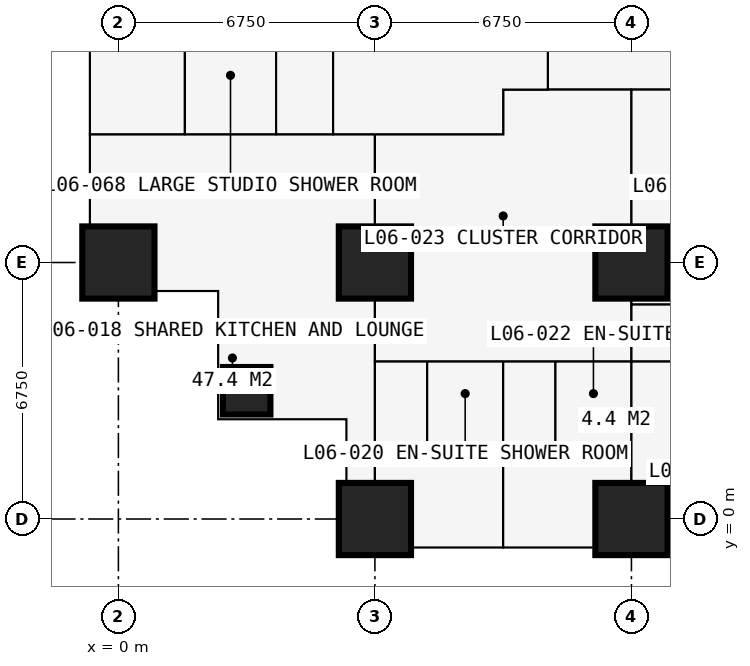
"""IFC4 building model, lengths in metres.
Left out: names, types, materials, properties, quantities, classifications, styles, units other than length and angle.
Written with IfcOpenShell. Run it as: python <this file> out.ifc"""

import sys

from ifc_helpers import new_model, si_unit, direction, frame, frame_2d, origin, origin_2d, place, context, subcontext, project, spatial, rectangle, extrude, element, fill, save


model = new_model("IFC4")
c1 = context("Model", 3, precision=1e-05, world=origin(), true_north=direction((0.0, 1.0)))
c2 = subcontext(c1, "Body", "Model", "MODEL_VIEW")
j1 = project(units=[si_unit("LENGTHUNIT", "METRE"), si_unit("PLANEANGLEUNIT", "RADIAN")], contexts=[c1])
p1 = place(None, origin())
s1 = spatial("IfcSite", under=j1, at=p1, CompositionType="ELEMENT")
p2 = place(p1, origin())
s2 = spatial("IfcBuilding", under=s1, at=p2, CompositionType="ELEMENT")
p3 = place(p2, frame((0.0, 0.0, 25.2)))
s3 = spatial("IfcBuildingStorey", under=s2, at=p3, CompositionType="ELEMENT", Elevation=25.2)
p4 = place(p3, frame((0.0, 6.75, 0.0), z_axis=(0.0, 0.0, 1.0), x_axis=(1.0, 0.0, 0.0)))
e1 = element("IfcColumn", 1, at=p4, inside=s3, PredefinedType="COLUMN", context=c2, shape_type="SweptSolid", body=[
    extrude(rectangle(XDim=1.9, YDim=1.9, at=origin_2d()), origin(), (0.0, 0.0, 1.0), 3.6),
])
p5 = place(p3, frame((3.375, 3.375, 0.0), z_axis=(0.0, 0.0, 1.0), x_axis=(1.0, 0.0, 0.0)))
e2 = element("IfcColumn", 2, at=p5, inside=s3, PredefinedType="COLUMN", context=c2, shape_type="SweptSolid", body=[
    extrude(rectangle(XDim=1.25, YDim=1.25, at=origin_2d()), origin(), (0.0, 0.0, 1.0), 3.6),
])
for number, where, z_axis, x_axis in (
    (3, (6.75, 0.0, 0.0), (0.0, 0.0, 1.0), (1.0, 0.0, 0.0)),
    (4, (6.75, 6.75, 0.0), (0.0, 0.0, 1.0), (1.0, 0.0, 0.0)),
    (5, (13.5, 0.0, 0.0), (0.0, 0.0, 1.0), (1.0, 0.0, 0.0)),
    (6, (13.5, 6.75, 0.0), (0.0, 0.0, 1.0), (1.0, 0.0, 0.0)),
):
    element("IfcColumn", number, at=place(p3, frame(where, z_axis=z_axis, x_axis=x_axis)), inside=s3, PredefinedType="COLUMN", context=c2, shape_type="SweptSolid", body=[
        extrude(rectangle(XDim=1.9, YDim=1.9, at=origin_2d()), origin(), (0.0, 0.0, 1.0), 3.6),
    ])
p6 = place(p3, frame((-0.75, 6.0, 0.0), z_axis=(0.0, 0.0, 1.0), x_axis=(1.0, 0.0, 0.0)))
e7 = element("IfcWall", 7, at=p6, inside=s3, PredefinedType="SOLIDWALL", context=c2, shape_type="SweptSolid", body=[
    extrude(rectangle(XDim=3.375, YDim=0.3, at=frame_2d((1.688, 0.0))), origin(), (0.0, 0.0, 1.0), 3.375),
])
p7 = place(p6, frame((1.857, 0.0, 0.9)))
e8 = element("IfcOpeningElement", 8, at=p7, cuts=e7, PredefinedType="OPENING", context=c2, shape_type="SweptSolid", body=[
    extrude(rectangle(XDim=1.2, YDim=1.8, at=frame_2d((0.6, 0.9))), frame((0.0, 0.16, 0.0), z_axis=(0.0, -1.0, 0.0), x_axis=(1.0, 0.0, 0.0)), (0.0, 0.0, 1.0), 0.32),
])
p8 = place(p3, frame((2.625, 6.0, 0.0), z_axis=(0.0, 0.0, 1.0), x_axis=(0.0, -1.0, 0.0)))
e9 = element("IfcWall", 9, at=p8, inside=s3, PredefinedType="SOLIDWALL", context=c2, shape_type="SweptSolid", body=[
    extrude(rectangle(XDim=3.375, YDim=0.3, at=frame_2d((1.688, 0.0))), origin(), (0.0, 0.0, 1.0), 3.375),
])
p9 = place(p8, frame((0.788, 0.0, 0.6)))
e10 = element("IfcOpeningElement", 10, at=p9, cuts=e9, PredefinedType="OPENING", context=c2, shape_type="SweptSolid", body=[
    extrude(rectangle(XDim=1.8, YDim=2.1, at=frame_2d((0.9, 1.05))), frame((0.0, 0.16, 0.0), z_axis=(0.0, -1.0, 0.0), x_axis=(1.0, 0.0, 0.0)), (0.0, 0.0, 1.0), 0.32),
])
p10 = place(p3, frame((2.625, 2.625, 0.0), z_axis=(0.0, 0.0, 1.0), x_axis=(1.0, 0.0, 0.0)))
e11 = element("IfcWall", 11, at=p10, inside=s3, PredefinedType="SOLIDWALL", context=c2, shape_type="SweptSolid", body=[
    extrude(rectangle(XDim=3.375, YDim=0.3, at=frame_2d((1.688, 0.0))), origin(), (0.0, 0.0, 1.0), 3.375),
])
p11 = place(p10, frame((0.788, 0.0, 0.6)))
e12 = element("IfcOpeningElement", 12, at=p11, cuts=e11, PredefinedType="OPENING", context=c2, shape_type="SweptSolid", body=[
    extrude(rectangle(XDim=1.8, YDim=2.1, at=frame_2d((0.9, 1.05))), frame((0.0, 0.16, 0.0), z_axis=(0.0, -1.0, 0.0), x_axis=(1.0, 0.0, 0.0)), (0.0, 0.0, 1.0), 0.32),
])
p12 = place(p3, frame((6.0, 2.625, 0.0), z_axis=(0.0, 0.0, 1.0), x_axis=(0.0, -1.0, 0.0)))
e13 = element("IfcWall", 13, at=p12, inside=s3, PredefinedType="SOLIDWALL", context=c2, shape_type="SweptSolid", body=[
    extrude(rectangle(XDim=3.375, YDim=0.3, at=frame_2d((1.688, 0.0))), origin(), (0.0, 0.0, 1.0), 3.375),
])
p13 = place(p12, frame((0.317, 0.0, 0.9)))
e14 = element("IfcOpeningElement", 14, at=p13, cuts=e13, PredefinedType="OPENING", context=c2, shape_type="SweptSolid", body=[
    extrude(rectangle(XDim=1.2, YDim=1.8, at=frame_2d((0.6, 0.9))), frame((0.0, 0.16, 0.0), z_axis=(0.0, -1.0, 0.0), x_axis=(1.0, 0.0, 0.0)), (0.0, 0.0, 1.0), 0.32),
])
p14 = place(p3, frame((20.25, -0.75, 0.0), z_axis=(0.0, 0.0, 1.0), x_axis=(-1.0, 0.0, 0.0)))
e15 = element("IfcWall", 15, at=p14, inside=s3, PredefinedType="SOLIDWALL", context=c2, shape_type="SweptSolid", body=[
    extrude(rectangle(XDim=6.75, YDim=0.15, at=frame_2d((3.375, 0.0))), origin(), (0.0, 0.0, 1.0), 3.375),
])
p15 = place(p14, frame((0.996, 0.0, 0.0)))
e16 = element("IfcOpeningElement", 16, at=p15, cuts=e15, PredefinedType="OPENING", context=c2, shape_type="SweptSolid", body=[
    extrude(rectangle(XDim=1.0, YDim=2.2, at=frame_2d((0.5, 1.1))), frame((0.0, 0.085, 0.0), z_axis=(0.0, -1.0, 0.0), x_axis=(1.0, 0.0, 0.0)), (0.0, 0.0, 1.0), 0.17),
])
p16 = place(p14, frame((2.042, 0.0, 0.9)))
e17 = element("IfcOpeningElement", 17, at=p16, cuts=e15, PredefinedType="OPENING", context=c2, shape_type="SweptSolid", body=[
    extrude(rectangle(XDim=1.2, YDim=1.8, at=frame_2d((0.6, 0.9))), frame((0.0, 0.085, 0.0), z_axis=(0.0, -1.0, 0.0), x_axis=(1.0, 0.0, 0.0)), (0.0, 0.0, 1.0), 0.17),
])
p17 = place(p14, frame((4.754, 0.0, 0.0)))
e18 = element("IfcOpeningElement", 18, at=p17, cuts=e15, PredefinedType="OPENING", context=c2, shape_type="SweptSolid", body=[
    extrude(rectangle(XDim=1.0, YDim=2.2, at=frame_2d((0.5, 1.1))), frame((0.0, 0.085, 0.0), z_axis=(0.0, -1.0, 0.0), x_axis=(1.0, 0.0, 0.0)), (0.0, 0.0, 1.0), 0.17),
])
p18 = place(p14, frame((3.508, 0.0, 0.9)))
e19 = element("IfcOpeningElement", 19, at=p18, cuts=e15, PredefinedType="OPENING", context=c2, shape_type="SweptSolid", body=[
    extrude(rectangle(XDim=1.2, YDim=1.8, at=frame_2d((0.6, 0.9))), frame((0.0, 0.085, 0.0), z_axis=(0.0, -1.0, 0.0), x_axis=(1.0, 0.0, 0.0)), (0.0, 0.0, 1.0), 0.17),
])
p19 = place(p3, frame((-0.734, 10.125, 0.0), z_axis=(0.0, 0.0, 1.0), x_axis=(1.0, 0.0, 0.0)))
e20 = element("IfcWall", 20, at=p19, inside=s3, PredefinedType="PARTITIONING", context=c2, shape_type="SweptSolid", body=[
    extrude(rectangle(XDim=10.859, YDim=0.15, at=frame_2d((5.429, 0.0))), origin(), (0.0, 0.0, 1.0), 3.375),
])
p20 = place(p19, frame((5.134, 0.0, 0.0)))
e21 = element("IfcOpeningElement", 21, at=p20, cuts=e20, PredefinedType="OPENING", context=c2, shape_type="SweptSolid", body=[
    extrude(rectangle(XDim=1.0, YDim=2.2, at=frame_2d((0.5, 1.1))), frame((0.0, 0.085, 0.0), z_axis=(0.0, -1.0, 0.0), x_axis=(1.0, 0.0, 0.0)), (0.0, 0.0, 1.0), 0.17),
])
p21 = place(p3, frame((1.75, 10.125, 0.0), z_axis=(0.0, 0.0, 1.0), x_axis=(0.0, 1.0, 0.0)))
e22 = element("IfcWall", 22, at=p21, inside=s3, PredefinedType="PARTITIONING", context=c2, shape_type="SweptSolid", body=[
    extrude(rectangle(XDim=2.6, YDim=0.1, at=frame_2d((1.3, 0.0))), origin(), (0.0, 0.0, 1.0), 3.375),
])
p22 = place(p21, frame((0.85, 0.0, 0.0)))
e23 = element("IfcOpeningElement", 23, at=p22, cuts=e22, PredefinedType="OPENING", context=c2, shape_type="SweptSolid", body=[
    extrude(rectangle(XDim=0.9, YDim=2.2, at=frame_2d((0.45, 1.1))), frame((0.0, 0.06, 0.0), z_axis=(0.0, -1.0, 0.0), x_axis=(1.0, 0.0, 0.0)), (0.0, 0.0, 1.0), 0.12),
])
p23 = place(p3, frame((4.15, 10.125, 0.0), z_axis=(0.0, 0.0, 1.0), x_axis=(0.0, 1.0, 0.0)))
e24 = element("IfcWall", 24, at=p23, inside=s3, PredefinedType="PARTITIONING", context=c2, shape_type="SweptSolid", body=[
    extrude(rectangle(XDim=23.625, YDim=0.15, at=frame_2d((11.812, 0.0))), origin(), (0.0, 0.0, 1.0), 3.375),
])
p24 = place(p23, frame((4.2, 0.0, 0.0)))
e25 = element("IfcOpeningElement", 25, at=p24, cuts=e24, PredefinedType="OPENING", context=c2, shape_type="SweptSolid", body=[
    extrude(rectangle(XDim=0.95, YDim=2.2, at=frame_2d((0.475, 1.1))), frame((0.0, 0.085, 0.0), z_axis=(0.0, -1.0, 0.0), x_axis=(1.0, 0.0, 0.0)), (0.0, 0.0, 1.0), 0.17),
])
p25 = place(p23, frame((10.95, 0.0, 0.0)))
e26 = element("IfcOpeningElement", 26, at=p25, cuts=e24, PredefinedType="OPENING", context=c2, shape_type="SweptSolid", body=[
    extrude(rectangle(XDim=0.95, YDim=2.2, at=frame_2d((0.475, 1.1))), frame((0.0, 0.085, 0.0), z_axis=(0.0, -1.0, 0.0), x_axis=(1.0, 0.0, 0.0)), (0.0, 0.0, 1.0), 0.17),
])
p26 = place(p23, frame((17.7, 0.0, 0.0)))
e27 = element("IfcOpeningElement", 27, at=p26, cuts=e24, PredefinedType="OPENING", context=c2, shape_type="SweptSolid", body=[
    extrude(rectangle(XDim=0.95, YDim=2.2, at=frame_2d((0.475, 1.1))), frame((0.0, 0.085, 0.0), z_axis=(0.0, -1.0, 0.0), x_axis=(1.0, 0.0, 0.0)), (0.0, 0.0, 1.0), 0.17),
])
p27 = place(p23, frame((20.5, 0.0, 0.0)))
e28 = element("IfcOpeningElement", 28, at=p27, cuts=e24, PredefinedType="OPENING", context=c2, shape_type="SweptSolid", body=[
    extrude(rectangle(XDim=0.95, YDim=2.2, at=frame_2d((0.475, 1.1))), frame((0.0, 0.085, 0.0), z_axis=(0.0, -1.0, 0.0), x_axis=(1.0, 0.0, 0.0)), (0.0, 0.0, 1.0), 0.17),
])
p28 = place(p3, frame((5.65, 10.125, 0.0), z_axis=(0.0, 0.0, 1.0), x_axis=(0.0, 1.0, 0.0)))
e29 = element("IfcWall", 29, at=p28, inside=s3, PredefinedType="PARTITIONING", context=c2, shape_type="SweptSolid", body=[
    extrude(rectangle(XDim=10.762, YDim=0.15, at=frame_2d((5.381, 0.0))), origin(), (0.0, 0.0, 1.0), 3.375),
])
p29 = place(p28, frame((4.9, 0.0, 0.0)))
e30 = element("IfcOpeningElement", 30, at=p29, cuts=e29, PredefinedType="OPENING", context=c2, shape_type="SweptSolid", body=[
    extrude(rectangle(XDim=0.95, YDim=2.2, at=frame_2d((0.475, 1.1))), frame((0.0, 0.085, 0.0), z_axis=(0.0, -1.0, 0.0), x_axis=(1.0, 0.0, 0.0)), (0.0, 0.0, 1.0), 0.17),
])
p30 = place(p3, frame((6.75, -0.734, 0.0), z_axis=(0.0, 0.0, 1.0), x_axis=(0.0, 1.0, 0.0)))
e31 = element("IfcWall", 31, at=p30, inside=s3, PredefinedType="PARTITIONING", context=c2, shape_type="SweptSolid", body=[
    extrude(rectangle(XDim=10.859, YDim=0.15, at=frame_2d((5.429, 0.0))), origin(), (0.0, 0.0, 1.0), 2.877),
])
p31 = place(p3, frame((6.75, 4.15, 0.0), z_axis=(0.0, 0.0, 1.0), x_axis=(1.0, 0.0, 0.0)))
e32 = element("IfcWall", 32, at=p31, inside=s3, PredefinedType="PARTITIONING", context=c2, shape_type="SweptSolid", body=[
    extrude(rectangle(XDim=23.625, YDim=0.15, at=frame_2d((11.812, 0.0))), origin(), (0.0, 0.0, 1.0), 3.375),
])
p32 = place(p31, frame((0.2, 0.0, 0.0)))
e33 = element("IfcOpeningElement", 33, at=p32, cuts=e32, PredefinedType="OPENING", context=c2, shape_type="SweptSolid", body=[
    extrude(rectangle(XDim=0.95, YDim=2.2, at=frame_2d((0.475, 1.1))), frame((0.0, 0.085, 0.0), z_axis=(0.0, -1.0, 0.0), x_axis=(1.0, 0.0, 0.0)), (0.0, 0.0, 1.0), 0.17),
])
p33 = place(p31, frame((3.625, 0.0, 0.0)))
e34 = element("IfcOpeningElement", 34, at=p33, cuts=e32, PredefinedType="OPENING", context=c2, shape_type="SweptSolid", body=[
    extrude(rectangle(XDim=0.95, YDim=2.2, at=frame_2d((0.475, 1.1))), frame((0.0, 0.085, 0.0), z_axis=(0.0, -1.0, 0.0), x_axis=(1.0, 0.0, 0.0)), (0.0, 0.0, 1.0), 0.17),
])
p34 = place(p31, frame((18.475, 0.0, 0.0)))
e35 = element("IfcOpeningElement", 35, at=p34, cuts=e32, PredefinedType="OPENING", context=c2, shape_type="SweptSolid", body=[
    extrude(rectangle(XDim=0.95, YDim=2.2, at=frame_2d((0.475, 1.1))), frame((0.0, 0.085, 0.0), z_axis=(0.0, -1.0, 0.0), x_axis=(1.0, 0.0, 0.0)), (0.0, 0.0, 1.0), 0.17),
])
p35 = place(p31, frame((11.725, 0.0, 0.0)))
e36 = element("IfcOpeningElement", 36, at=p35, cuts=e32, PredefinedType="OPENING", context=c2, shape_type="SweptSolid", body=[
    extrude(rectangle(XDim=0.95, YDim=2.2, at=frame_2d((0.475, 1.1))), frame((0.0, 0.085, 0.0), z_axis=(0.0, -1.0, 0.0), x_axis=(1.0, 0.0, 0.0)), (0.0, 0.0, 1.0), 0.17),
])
p36 = place(p31, frame((6.95, 0.0, 0.0)))
e37 = element("IfcOpeningElement", 37, at=p36, cuts=e32, PredefinedType="OPENING", context=c2, shape_type="SweptSolid", body=[
    extrude(rectangle(XDim=0.95, YDim=2.2, at=frame_2d((0.475, 1.1))), frame((0.0, 0.085, 0.0), z_axis=(0.0, -1.0, 0.0), x_axis=(1.0, 0.0, 0.0)), (0.0, 0.0, 1.0), 0.17),
])
p37 = place(p3, frame((8.125, 1.95, 0.0), z_axis=(0.0, 0.0, 1.0), x_axis=(0.0, 1.0, 0.0)))
e38 = element("IfcWall", 38, at=p37, inside=s3, PredefinedType="PARTITIONING", context=c2, shape_type="SweptSolid", body=[
    extrude(rectangle(XDim=2.2, YDim=0.1, at=frame_2d((1.1, 0.0))), origin(), (0.0, 0.0, 1.0), 3.375),
])
p38 = place(p37, frame((0.65, 0.0, 0.0)))
e39 = element("IfcOpeningElement", 39, at=p38, cuts=e38, PredefinedType="OPENING", context=c2, shape_type="SweptSolid", body=[
    extrude(rectangle(XDim=0.9, YDim=2.2, at=frame_2d((0.45, 1.1))), frame((0.0, 0.06, 0.0), z_axis=(0.0, -1.0, 0.0), x_axis=(1.0, 0.0, 0.0)), (0.0, 0.0, 1.0), 0.12),
])
p39 = place(p3, frame((8.125, 1.95, 0.0), z_axis=(0.0, 0.0, 1.0), x_axis=(1.0, 0.0, 0.0)))
e40 = element("IfcWall", 40, at=p39, inside=s3, PredefinedType="PARTITIONING", context=c2, shape_type="SweptSolid", body=[
    extrude(rectangle(XDim=2.0, YDim=0.1, at=frame_2d((1.0, 0.0))), origin(), (0.0, 0.0, 1.0), 3.375),
])
p40 = place(p3, frame((10.125, -0.734, 0.0), z_axis=(0.0, 0.0, 1.0), x_axis=(0.0, 1.0, 0.0)))
e41 = element("IfcWall", 41, at=p40, inside=s3, PredefinedType="PARTITIONING", context=c2, shape_type="SweptSolid", body=[
    extrude(rectangle(XDim=4.884, YDim=0.175, at=frame_2d((2.442, 0.0))), origin(), (0.0, 0.0, 1.0), 3.375),
])
p41 = place(p3, frame((10.125, 10.125, 0.0), z_axis=(0.0, 0.0, 1.0), x_axis=(0.0, 1.0, 0.0)))
e42 = element("IfcWall", 42, at=p41, inside=s3, PredefinedType="PARTITIONING", context=c2, shape_type="SweptSolid", body=[
    extrude(rectangle(XDim=1.175, YDim=0.15, at=frame_2d((0.587, 0.0))), origin(), (0.0, 0.0, 1.0), 3.375),
])
p42 = place(p3, frame((10.125, 11.3, 0.0), z_axis=(0.0, 0.0, 1.0), x_axis=(1.0, 0.0, 0.0)))
e43 = element("IfcWall", 43, at=p42, inside=s3, PredefinedType="PARTITIONING", context=c2, shape_type="SweptSolid", body=[
    extrude(rectangle(XDim=20.675, YDim=0.15, at=frame_2d((10.337, 0.0))), origin(), (0.0, 0.0, 1.0), 3.375),
])
p43 = place(p42, frame((1.775, 0.0, 0.0)))
e44 = element("IfcOpeningElement", 44, at=p43, cuts=e43, PredefinedType="OPENING", context=c2, shape_type="SweptSolid", body=[
    extrude(rectangle(XDim=1.0, YDim=2.2, at=frame_2d((0.5, 1.1))), frame((0.0, 0.085, 0.0), z_axis=(0.0, -1.0, 0.0), x_axis=(1.0, 0.0, 0.0)), (0.0, 0.0, 1.0), 0.17),
])
p44 = place(p42, frame((11.312, 0.0, 0.0)))
e45 = element("IfcOpeningElement", 45, at=p44, cuts=e43, PredefinedType="OPENING", context=c2, shape_type="SweptSolid", body=[
    extrude(rectangle(XDim=1.0, YDim=2.2, at=frame_2d((0.5, 1.1))), frame((0.0, 0.085, 0.0), z_axis=(0.0, -1.0, 0.0), x_axis=(1.0, 0.0, 0.0)), (0.0, 0.0, 1.0), 0.17),
])
p45 = place(p3, frame((11.3, 11.3, 0.0), z_axis=(0.0, 0.0, 1.0), x_axis=(0.0, 1.0, 0.0)))
e46 = element("IfcWall", 46, at=p45, inside=s3, PredefinedType="PARTITIONING", context=c2, shape_type="SweptSolid", body=[
    extrude(rectangle(XDim=19.075, YDim=0.15, at=frame_2d((9.538, 0.0))), origin(), (0.0, 0.0, 1.0), 3.375),
])
p46 = place(p45, frame((10.137, 0.0, 0.0)))
e47 = element("IfcOpeningElement", 47, at=p46, cuts=e46, PredefinedType="OPENING", context=c2, shape_type="SweptSolid", body=[
    extrude(rectangle(XDim=1.0, YDim=2.2, at=frame_2d((0.5, 1.1))), frame((0.0, 0.085, 0.0), z_axis=(0.0, -1.0, 0.0), x_axis=(1.0, 0.0, 0.0)), (0.0, 0.0, 1.0), 0.17),
])
p47 = place(p3, frame((11.5, 1.95, 0.0), z_axis=(0.0, 0.0, 1.0), x_axis=(0.0, 1.0, 0.0)))
e48 = element("IfcWall", 48, at=p47, inside=s3, PredefinedType="PARTITIONING", context=c2, shape_type="SweptSolid", body=[
    extrude(rectangle(XDim=2.2, YDim=0.1, at=frame_2d((1.1, 0.0))), origin(), (0.0, 0.0, 1.0), 3.375),
])
p48 = place(p47, frame((0.65, 0.0, 0.0)))
e49 = element("IfcOpeningElement", 49, at=p48, cuts=e48, PredefinedType="OPENING", context=c2, shape_type="SweptSolid", body=[
    extrude(rectangle(XDim=0.9, YDim=2.2, at=frame_2d((0.45, 1.1))), frame((0.0, 0.06, 0.0), z_axis=(0.0, -1.0, 0.0), x_axis=(1.0, 0.0, 0.0)), (0.0, 0.0, 1.0), 0.12),
])
p49 = place(p3, frame((11.5, 1.95, 0.0), z_axis=(0.0, 0.0, 1.0), x_axis=(1.0, 0.0, 0.0)))
e50 = element("IfcWall", 50, at=p49, inside=s3, PredefinedType="PARTITIONING", context=c2, shape_type="SweptSolid", body=[
    extrude(rectangle(XDim=2.0, YDim=0.1, at=frame_2d((1.0, 0.0))), origin(), (0.0, 0.0, 1.0), 3.375),
])
p50 = place(p3, frame((13.5, -0.734, 0.0), z_axis=(0.0, 0.0, 1.0), x_axis=(0.0, 1.0, 0.0)))
e51 = element("IfcWall", 51, at=p50, inside=s3, PredefinedType="PARTITIONING", context=c2, shape_type="SweptSolid", body=[
    extrude(rectangle(XDim=12.034, YDim=0.15, at=frame_2d((6.017, 0.0))), origin(), (0.0, 0.0, 1.0), 2.877),
])
p51 = place(p3, frame((13.5, 5.65, 0.0), z_axis=(0.0, 0.0, 1.0), x_axis=(1.0, 0.0, 0.0)))
e52 = element("IfcWall", 52, at=p51, inside=s3, PredefinedType="PARTITIONING", context=c2, shape_type="SweptSolid", body=[
    extrude(rectangle(XDim=7.387, YDim=0.15, at=frame_2d((3.694, 0.0))), origin(), (0.0, 0.0, 1.0), 3.375),
])
p52 = place(p51, frame((3.2, 0.0, 0.0)))
e53 = element("IfcOpeningElement", 53, at=p52, cuts=e52, PredefinedType="OPENING", context=c2, shape_type="SweptSolid", body=[
    extrude(rectangle(XDim=0.95, YDim=2.2, at=frame_2d((0.475, 1.1))), frame((0.0, 0.085, 0.0), z_axis=(0.0, -1.0, 0.0), x_axis=(1.0, 0.0, 0.0)), (0.0, 0.0, 1.0), 0.17),
])
p53 = place(p7, origin())
e54 = element("IfcWindow", 54, at=p53, inside=s3, PartitioningType="SINGLE_PANEL", PredefinedType="WINDOW", context=c2, shape_type="SweptSolid", body=[
    extrude(rectangle(XDim=1.2, YDim=1.8, at=frame_2d((0.6, 0.9))), frame((0.0, 0.03, 0.0), z_axis=(0.0, -1.0, 0.0), x_axis=(1.0, 0.0, 0.0)), (0.0, 0.0, 1.0), 0.06),
])
fill(e8, e54)
p54 = place(p9, origin())
e55 = element("IfcWindow", 55, at=p54, inside=s3, PartitioningType="SINGLE_PANEL", PredefinedType="WINDOW", context=c2, shape_type="SweptSolid", body=[
    extrude(rectangle(XDim=1.8, YDim=2.1, at=frame_2d((0.9, 1.05))), frame((0.0, 0.03, 0.0), z_axis=(0.0, -1.0, 0.0), x_axis=(1.0, 0.0, 0.0)), (0.0, 0.0, 1.0), 0.06),
])
fill(e10, e55)
p55 = place(p11, origin())
e56 = element("IfcWindow", 56, at=p55, inside=s3, PartitioningType="SINGLE_PANEL", PredefinedType="WINDOW", context=c2, shape_type="SweptSolid", body=[
    extrude(rectangle(XDim=1.8, YDim=2.1, at=frame_2d((0.9, 1.05))), frame((0.0, 0.03, 0.0), z_axis=(0.0, -1.0, 0.0), x_axis=(1.0, 0.0, 0.0)), (0.0, 0.0, 1.0), 0.06),
])
fill(e12, e56)
p56 = place(p13, origin())
e57 = element("IfcWindow", 57, at=p56, inside=s3, PartitioningType="SINGLE_PANEL", PredefinedType="WINDOW", context=c2, shape_type="SweptSolid", body=[
    extrude(rectangle(XDim=1.2, YDim=1.8, at=frame_2d((0.6, 0.9))), frame((0.0, 0.03, 0.0), z_axis=(0.0, -1.0, 0.0), x_axis=(1.0, 0.0, 0.0)), (0.0, 0.0, 1.0), 0.06),
])
fill(e14, e57)
p57 = place(p17, origin())
e58 = element("IfcDoor", 58, at=p57, inside=s3, OperationType="SINGLE_SWING_RIGHT", PredefinedType="DOOR", context=c2, shape_type="SweptSolid", body=[
    extrude(rectangle(XDim=1.0, YDim=2.2, at=frame_2d((0.5, 1.1))), frame((0.0, 0.025, 0.0), z_axis=(0.0, -1.0, 0.0), x_axis=(1.0, 0.0, 0.0)), (0.0, 0.0, 1.0), 0.05),
])
fill(e18, e58)
p58 = place(p20, origin())
e59 = element("IfcDoor", 59, at=p58, inside=s3, OperationType="SINGLE_SWING_LEFT", PredefinedType="DOOR", context=c2, shape_type="SweptSolid", body=[
    extrude(rectangle(XDim=1.0, YDim=2.2, at=frame_2d((0.5, 1.1))), frame((0.0, 0.025, 0.0), z_axis=(0.0, -1.0, 0.0), x_axis=(1.0, 0.0, 0.0)), (0.0, 0.0, 1.0), 0.05),
])
fill(e21, e59)
p59 = place(p32, origin())
e60 = element("IfcDoor", 60, at=p59, inside=s3, OperationType="SINGLE_SWING_LEFT", PredefinedType="DOOR", context=c2, shape_type="SweptSolid", body=[
    extrude(rectangle(XDim=0.95, YDim=2.2, at=frame_2d((0.475, 1.1))), frame((0.0, 0.025, 0.0), z_axis=(0.0, -1.0, 0.0), x_axis=(1.0, 0.0, 0.0)), (0.0, 0.0, 1.0), 0.05),
])
fill(e33, e60)
p60 = place(p38, origin())
e61 = element("IfcDoor", 61, at=p60, inside=s3, OperationType="SINGLE_SWING_RIGHT", PredefinedType="DOOR", context=c2, shape_type="SweptSolid", body=[
    extrude(rectangle(XDim=0.9, YDim=2.2, at=frame_2d((0.45, 1.1))), frame((0.0, 0.025, 0.0), z_axis=(0.0, -1.0, 0.0), x_axis=(1.0, 0.0, 0.0)), (0.0, 0.0, 1.0), 0.05),
])
fill(e39, e61)
p61 = place(p33, origin())
e62 = element("IfcDoor", 62, at=p61, inside=s3, OperationType="SINGLE_SWING_LEFT", PredefinedType="DOOR", context=c2, shape_type="SweptSolid", body=[
    extrude(rectangle(XDim=0.95, YDim=2.2, at=frame_2d((0.475, 1.1))), frame((0.0, 0.025, 0.0), z_axis=(0.0, -1.0, 0.0), x_axis=(1.0, 0.0, 0.0)), (0.0, 0.0, 1.0), 0.05),
])
fill(e34, e62)
p62 = place(p48, origin())
e63 = element("IfcDoor", 63, at=p62, inside=s3, OperationType="SINGLE_SWING_RIGHT", PredefinedType="DOOR", context=c2, shape_type="SweptSolid", body=[
    extrude(rectangle(XDim=0.9, YDim=2.2, at=frame_2d((0.45, 1.1))), frame((0.0, 0.025, 0.0), z_axis=(0.0, -1.0, 0.0), x_axis=(1.0, 0.0, 0.0)), (0.0, 0.0, 1.0), 0.05),
])
fill(e49, e63)
p63 = place(p43, origin())
e64 = element("IfcDoor", 64, at=p63, inside=s3, OperationType="SINGLE_SWING_LEFT", PredefinedType="DOOR", context=c2, shape_type="SweptSolid", body=[
    extrude(rectangle(XDim=1.0, YDim=2.2, at=frame_2d((0.5, 1.1))), frame((0.0, 0.025, 0.0), z_axis=(0.0, -1.0, 0.0), x_axis=(1.0, 0.0, 0.0)), (0.0, 0.0, 1.0), 0.05),
])
fill(e44, e64)
p64 = place(p36, origin())
e65 = element("IfcDoor", 65, at=p64, inside=s3, OperationType="SINGLE_SWING_LEFT", PredefinedType="DOOR", context=c2, shape_type="SweptSolid", body=[
    extrude(rectangle(XDim=0.95, YDim=2.2, at=frame_2d((0.475, 1.1))), frame((0.0, 0.025, 0.0), z_axis=(0.0, -1.0, 0.0), x_axis=(1.0, 0.0, 0.0)), (0.0, 0.0, 1.0), 0.05),
])
fill(e37, e65)
p65 = place(p22, origin())
e66 = element("IfcDoor", 66, at=p65, inside=s3, OperationType="SINGLE_SWING_RIGHT", PredefinedType="DOOR", context=c2, shape_type="SweptSolid", body=[
    extrude(rectangle(XDim=0.9, YDim=2.2, at=frame_2d((0.45, 1.1))), frame((0.0, 0.025, 0.0), z_axis=(0.0, -1.0, 0.0), x_axis=(1.0, 0.0, 0.0)), (0.0, 0.0, 1.0), 0.05),
])
fill(e23, e66)
save(model, sys.argv[1])
